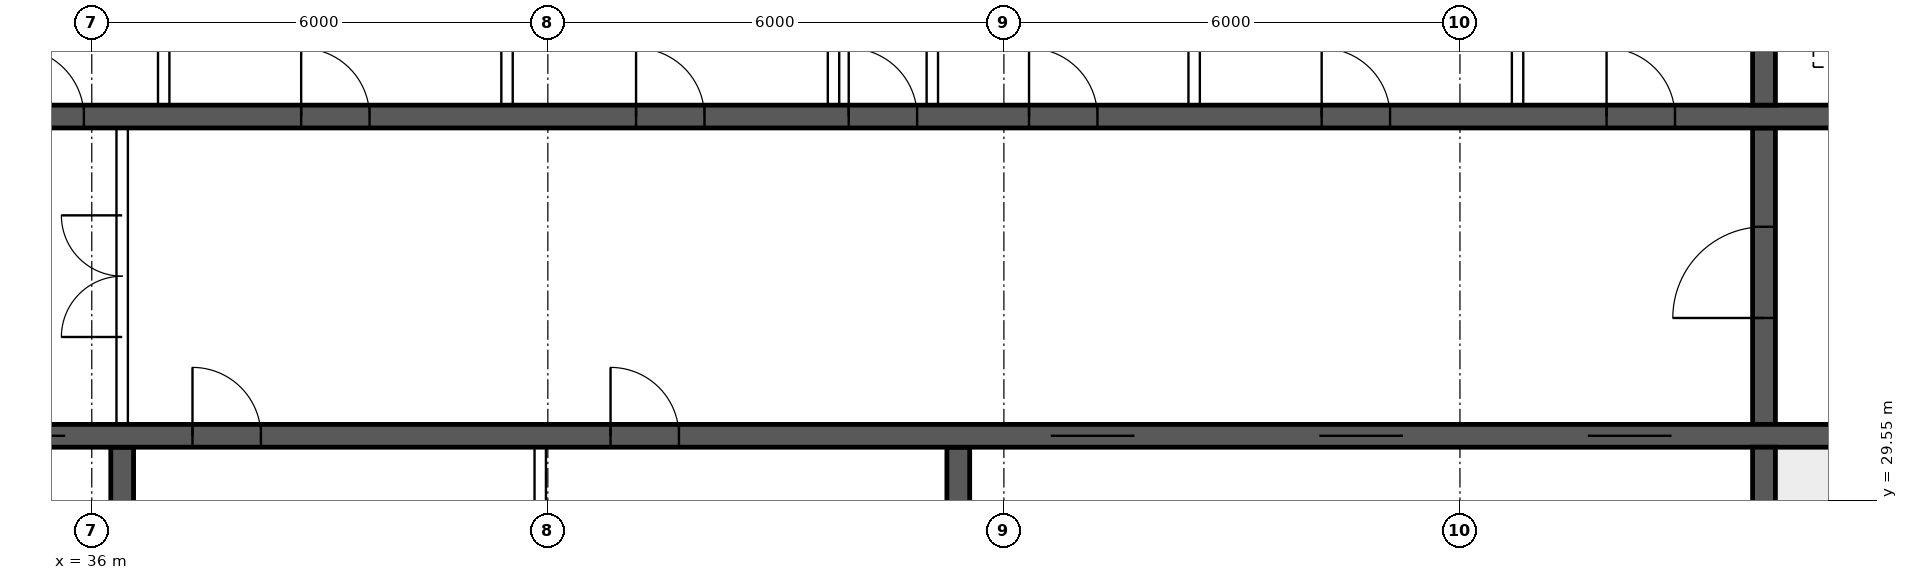
"""IFC4 building model, lengths in metres.
Left out: names, types, materials, properties, quantities, classifications, styles, units other than length and angle.
Written with IfcOpenShell. Run it as: python <this file> out.ifc"""

import sys

from ifc_helpers import new_model, si_unit, direction, frame, frame_2d, origin, place, context, subcontext, project, spatial, rectangle, extrude, element, fill, save


model = new_model("IFC4")
c1 = context("Model", 3, precision=1e-05, world=origin(), true_north=direction((0.0, 1.0)))
c2 = subcontext(c1, "Body", "Model", "MODEL_VIEW")
j1 = project(units=[si_unit("LENGTHUNIT", "METRE"), si_unit("PLANEANGLEUNIT", "RADIAN")], contexts=[c1])
p1 = place(None, origin())
s1 = spatial("IfcSite", under=j1, at=p1, CompositionType="ELEMENT")
p2 = place(p1, origin())
s2 = spatial("IfcBuilding", under=s1, at=p2, CompositionType="ELEMENT")
p3 = place(p2, frame((0.0, 0.0, 216.55)))
s3 = spatial("IfcBuildingStorey", under=s2, at=p3, CompositionType="ELEMENT", Elevation=216.55)
p4 = place(p3, frame((18.35, 30.4, 0.0), z_axis=(0.0, 0.0, 1.0), x_axis=(1.0, 0.0, 0.0)))
e1 = element("IfcWall", 1, at=p4, inside=s3, PredefinedType="SHEAR", context=c2, shape_type="SweptSolid", body=[
    extrude(rectangle(XDim=47.3, YDim=0.3, at=frame_2d((23.65, 0.0))), origin(), (0.0, 0.0, 1.0), 3.75),
])
p5 = place(p4, frame((0.4, 0.0, 0.0)))
e2 = element("IfcOpeningElement", 2, at=p5, cuts=e1, PredefinedType="OPENING", context=c2, shape_type="SweptSolid", body=[
    extrude(rectangle(XDim=1.0, YDim=2.1, at=frame_2d((0.5, 1.05))), frame((0.0, 0.16, 0.0), z_axis=(0.0, -1.0, 0.0), x_axis=(1.0, 0.0, 0.0)), (0.0, 0.0, 1.0), 0.32),
])
p6 = place(p4, frame((45.9, 0.0, 0.0)))
e3 = element("IfcOpeningElement", 3, at=p6, cuts=e1, PredefinedType="OPENING", context=c2, shape_type="SweptSolid", body=[
    extrude(rectangle(XDim=1.0, YDim=2.1, at=frame_2d((0.5, 1.05))), frame((0.0, 0.16, 0.0), z_axis=(0.0, -1.0, 0.0), x_axis=(1.0, 0.0, 0.0)), (0.0, 0.0, 1.0), 0.32),
])
p7 = place(p4, frame((8.4, 0.0, 0.0)))
e4 = element("IfcOpeningElement", 4, at=p7, cuts=e1, PredefinedType="OPENING", context=c2, shape_type="SweptSolid", body=[
    extrude(rectangle(XDim=1.1, YDim=2.1, at=frame_2d((0.55, 1.05))), frame((0.0, 0.16, 0.0), z_axis=(0.0, -1.0, 0.0), x_axis=(1.0, 0.0, 0.0)), (0.0, 0.0, 1.0), 0.32),
])
p8 = place(p4, frame((11.0, 0.0, 0.0)))
e5 = element("IfcOpeningElement", 5, at=p8, cuts=e1, PredefinedType="OPENING", context=c2, shape_type="SweptSolid", body=[
    extrude(rectangle(XDim=1.1, YDim=2.1, at=frame_2d((0.55, 1.05))), frame((0.0, 0.16, 0.0), z_axis=(0.0, -1.0, 0.0), x_axis=(1.0, 0.0, 0.0)), (0.0, 0.0, 1.0), 0.32),
])
p9 = place(p4, frame((13.6, 0.0, 0.0)))
e6 = element("IfcOpeningElement", 6, at=p9, cuts=e1, PredefinedType="OPENING", context=c2, shape_type="SweptSolid", body=[
    extrude(rectangle(XDim=1.1, YDim=2.1, at=frame_2d((0.55, 1.05))), frame((0.0, 0.16, 0.0), z_axis=(0.0, -1.0, 0.0), x_axis=(1.0, 0.0, 0.0)), (0.0, 0.0, 1.0), 0.32),
])
p10 = place(p4, frame((16.2, 0.0, 0.0)))
e7 = element("IfcOpeningElement", 7, at=p10, cuts=e1, PredefinedType="OPENING", context=c2, shape_type="SweptSolid", body=[
    extrude(rectangle(XDim=1.1, YDim=2.1, at=frame_2d((0.55, 1.05))), frame((0.0, 0.16, 0.0), z_axis=(0.0, -1.0, 0.0), x_axis=(1.0, 0.0, 0.0)), (0.0, 0.0, 1.0), 0.32),
])
p11 = place(p4, frame((18.975, 0.0, 0.0)))
e8 = element("IfcOpeningElement", 8, at=p11, cuts=e1, PredefinedType="OPENING", context=c2, shape_type="SweptSolid", body=[
    extrude(rectangle(XDim=0.9, YDim=2.1, at=frame_2d((0.45, 1.05))), frame((0.0, 0.16, 0.0), z_axis=(0.0, -1.0, 0.0), x_axis=(1.0, 0.0, 0.0)), (0.0, 0.0, 1.0), 0.32),
])
p12 = place(p4, frame((24.475, 0.0, 0.0)))
e9 = element("IfcOpeningElement", 9, at=p12, cuts=e1, PredefinedType="OPENING", context=c2, shape_type="SweptSolid", body=[
    extrude(rectangle(XDim=0.9, YDim=2.1, at=frame_2d((0.45, 1.05))), frame((0.0, 0.16, 0.0), z_axis=(0.0, -1.0, 0.0), x_axis=(1.0, 0.0, 0.0)), (0.0, 0.0, 1.0), 0.32),
])
p13 = place(p4, frame((30.267, 0.0, 0.0)))
e10 = element("IfcOpeningElement", 10, at=p13, cuts=e1, PredefinedType="OPENING", context=c2, shape_type="SweptSolid", body=[
    extrude(rectangle(XDim=1.1, YDim=2.1, at=frame_2d((0.55, 1.05))), frame((0.0, 0.16, 0.0), z_axis=(0.0, -1.0, 0.0), x_axis=(1.0, 0.0, 0.0)), (0.0, 0.0, 1.0), 0.32),
])
p14 = place(p4, frame((33.8, 0.0, 0.0)))
e11 = element("IfcOpeningElement", 11, at=p14, cuts=e1, PredefinedType="OPENING", context=c2, shape_type="SweptSolid", body=[
    extrude(rectangle(XDim=1.1, YDim=2.1, at=frame_2d((0.55, 1.05))), frame((0.0, 0.16, 0.0), z_axis=(0.0, -1.0, 0.0), x_axis=(1.0, 0.0, 0.0)), (0.0, 0.0, 1.0), 0.32),
])
p15 = place(p4, frame((37.333, 0.0, 0.0)))
e12 = element("IfcOpeningElement", 12, at=p15, cuts=e1, PredefinedType="OPENING", context=c2, shape_type="SweptSolid", body=[
    extrude(rectangle(XDim=1.1, YDim=2.1, at=frame_2d((0.55, 1.05))), frame((0.0, 0.16, 0.0), z_axis=(0.0, -1.0, 0.0), x_axis=(1.0, 0.0, 0.0)), (0.0, 0.0, 1.0), 0.32),
])
p16 = place(p3, frame((18.35, 34.6, 0.0), z_axis=(0.0, 0.0, 1.0), x_axis=(1.0, 0.0, 0.0)))
e13 = element("IfcWall", 13, at=p16, inside=s3, PredefinedType="SHEAR", context=c2, shape_type="SweptSolid", body=[
    extrude(rectangle(XDim=47.3, YDim=0.3, at=frame_2d((23.65, 0.0))), origin(), (0.0, 0.0, 1.0), 3.75),
])
p17 = place(p16, frame((0.9, 0.0, 0.0)))
e14 = element("IfcOpeningElement", 14, at=p17, cuts=e13, PredefinedType="OPENING", context=c2, shape_type="SweptSolid", body=[
    extrude(rectangle(XDim=1.1, YDim=2.1, at=frame_2d((0.55, 1.05))), frame((0.0, 0.16, 0.0), z_axis=(0.0, -1.0, 0.0), x_axis=(1.0, 0.0, 0.0)), (0.0, 0.0, 1.0), 0.32),
])
p18 = place(p16, frame((45.3, 0.0, 0.0)))
e15 = element("IfcOpeningElement", 15, at=p18, cuts=e13, PredefinedType="OPENING", context=c2, shape_type="SweptSolid", body=[
    extrude(rectangle(XDim=1.1, YDim=2.1, at=frame_2d((0.55, 1.05))), frame((0.0, 0.16, 0.0), z_axis=(0.0, -1.0, 0.0), x_axis=(1.0, 0.0, 0.0)), (0.0, 0.0, 1.0), 0.32),
])
p19 = place(p16, frame((4.25, 0.0, 0.0)))
e16 = element("IfcOpeningElement", 16, at=p19, cuts=e13, PredefinedType="OPENING", context=c2, shape_type="SweptSolid", body=[
    extrude(rectangle(XDim=0.9, YDim=2.1, at=frame_2d((0.45, 1.05))), frame((0.0, 0.16, 0.0), z_axis=(0.0, -1.0, 0.0), x_axis=(1.0, 0.0, 0.0)), (0.0, 0.0, 1.0), 0.32),
])
p20 = place(p16, frame((42.15, 0.0, 0.0)))
e17 = element("IfcOpeningElement", 17, at=p20, cuts=e13, PredefinedType="OPENING", context=c2, shape_type="SweptSolid", body=[
    extrude(rectangle(XDim=0.9, YDim=2.1, at=frame_2d((0.45, 1.05))), frame((0.0, 0.16, 0.0), z_axis=(0.0, -1.0, 0.0), x_axis=(1.0, 0.0, 0.0)), (0.0, 0.0, 1.0), 0.32),
])
p21 = place(p16, frame((9.025, 0.0, 0.0)))
e18 = element("IfcOpeningElement", 18, at=p21, cuts=e13, PredefinedType="OPENING", context=c2, shape_type="SweptSolid", body=[
    extrude(rectangle(XDim=0.9, YDim=2.1, at=frame_2d((0.45, 1.05))), frame((0.0, 0.16, 0.0), z_axis=(0.0, -1.0, 0.0), x_axis=(1.0, 0.0, 0.0)), (0.0, 0.0, 1.0), 0.32),
])
p22 = place(p16, frame((12.999, 0.0, 0.0)))
e19 = element("IfcOpeningElement", 19, at=p22, cuts=e13, PredefinedType="OPENING", context=c2, shape_type="SweptSolid", body=[
    extrude(rectangle(XDim=0.9, YDim=2.1, at=frame_2d((0.45, 1.05))), frame((0.0, 0.16, 0.0), z_axis=(0.0, -1.0, 0.0), x_axis=(1.0, 0.0, 0.0)), (0.0, 0.0, 1.0), 0.32),
])
p23 = place(p16, frame((16.646, 0.0, 0.0)))
e20 = element("IfcOpeningElement", 20, at=p23, cuts=e13, PredefinedType="OPENING", context=c2, shape_type="SweptSolid", body=[
    extrude(rectangle(XDim=0.9, YDim=2.1, at=frame_2d((0.45, 1.05))), frame((0.0, 0.16, 0.0), z_axis=(0.0, -1.0, 0.0), x_axis=(1.0, 0.0, 0.0)), (0.0, 0.0, 1.0), 0.32),
])
p24 = place(p16, frame((20.405, 0.0, 0.0)))
e21 = element("IfcOpeningElement", 21, at=p24, cuts=e13, PredefinedType="OPENING", context=c2, shape_type="SweptSolid", body=[
    extrude(rectangle(XDim=0.9, YDim=2.1, at=frame_2d((0.45, 1.05))), frame((0.0, 0.16, 0.0), z_axis=(0.0, -1.0, 0.0), x_axis=(1.0, 0.0, 0.0)), (0.0, 0.0, 1.0), 0.32),
])
p25 = place(p16, frame((24.811, 0.0, 0.0)))
e22 = element("IfcOpeningElement", 22, at=p25, cuts=e13, PredefinedType="OPENING", context=c2, shape_type="SweptSolid", body=[
    extrude(rectangle(XDim=0.9, YDim=2.1, at=frame_2d((0.45, 1.05))), frame((0.0, 0.16, 0.0), z_axis=(0.0, -1.0, 0.0), x_axis=(1.0, 0.0, 0.0)), (0.0, 0.0, 1.0), 0.32),
])
p26 = place(p16, frame((27.608, 0.0, 0.0)))
e23 = element("IfcOpeningElement", 23, at=p26, cuts=e13, PredefinedType="OPENING", context=c2, shape_type="SweptSolid", body=[
    extrude(rectangle(XDim=0.9, YDim=2.1, at=frame_2d((0.45, 1.05))), frame((0.0, 0.16, 0.0), z_axis=(0.0, -1.0, 0.0), x_axis=(1.0, 0.0, 0.0)), (0.0, 0.0, 1.0), 0.32),
])
p27 = place(p16, frame((29.981, 0.0, 0.0)))
e24 = element("IfcOpeningElement", 24, at=p27, cuts=e13, PredefinedType="OPENING", context=c2, shape_type="SweptSolid", body=[
    extrude(rectangle(XDim=0.9, YDim=2.1, at=frame_2d((0.45, 1.05))), frame((0.0, 0.16, 0.0), z_axis=(0.0, -1.0, 0.0), x_axis=(1.0, 0.0, 0.0)), (0.0, 0.0, 1.0), 0.32),
])
p28 = place(p16, frame((33.831, 0.0, 0.0)))
e25 = element("IfcOpeningElement", 25, at=p28, cuts=e13, PredefinedType="OPENING", context=c2, shape_type="SweptSolid", body=[
    extrude(rectangle(XDim=0.9, YDim=2.1, at=frame_2d((0.45, 1.05))), frame((0.0, 0.16, 0.0), z_axis=(0.0, -1.0, 0.0), x_axis=(1.0, 0.0, 0.0)), (0.0, 0.0, 1.0), 0.32),
])
p29 = place(p16, frame((37.579, 0.0, 0.0)))
e26 = element("IfcOpeningElement", 26, at=p29, cuts=e13, PredefinedType="OPENING", context=c2, shape_type="SweptSolid", body=[
    extrude(rectangle(XDim=0.9, YDim=2.1, at=frame_2d((0.45, 1.05))), frame((0.0, 0.16, 0.0), z_axis=(0.0, -1.0, 0.0), x_axis=(1.0, 0.0, 0.0)), (0.0, 0.0, 1.0), 0.32),
])
p30 = place(p3, frame((58.0, 26.15, 0.0), z_axis=(0.0, 0.0, 1.0), x_axis=(0.0, 1.0, 0.0)))
e27 = element("IfcWall", 27, at=p30, inside=s3, PredefinedType="SHEAR", context=c2, shape_type="SweptSolid", body=[
    extrude(rectangle(XDim=4.1, YDim=0.3, at=frame_2d((2.05, 0.0))), origin(), (0.0, 0.0, 1.0), 3.75),
])
p31 = place(p3, frame((58.0, 30.55, 0.0), z_axis=(0.0, 0.0, 1.0), x_axis=(0.0, 1.0, 0.0)))
e28 = element("IfcWall", 28, at=p31, inside=s3, PredefinedType="SHEAR", context=c2, shape_type="SweptSolid", body=[
    extrude(rectangle(XDim=3.9, YDim=0.3, at=frame_2d((1.95, 0.0))), origin(), (0.0, 0.0, 1.0), 3.75),
])
p32 = place(p31, frame((1.4, 0.0, 0.0)))
e29 = element("IfcOpeningElement", 29, at=p32, cuts=e28, PredefinedType="OPENING", context=c2, shape_type="SweptSolid", body=[
    extrude(rectangle(XDim=1.2, YDim=2.1, at=frame_2d((0.6, 1.05))), frame((0.0, 0.16, 0.0), z_axis=(0.0, -1.0, 0.0), x_axis=(1.0, 0.0, 0.0)), (0.0, 0.0, 1.0), 0.32),
])
p33 = place(p3, frame((58.0, 34.75, 0.0), z_axis=(0.0, 0.0, 1.0), x_axis=(0.0, 1.0, 0.0)))
e30 = element("IfcWall", 30, at=p33, inside=s3, PredefinedType="SHEAR", context=c2, shape_type="SweptSolid", body=[
    extrude(rectangle(XDim=3.1, YDim=0.3, at=frame_2d((1.55, 0.0))), origin(), (0.0, 0.0, 1.0), 3.75),
])
for number, where, z_axis, x_axis in (
    (31, (36.4, 26.15, 0.0), (0.0, 0.0, 1.0), (0.0, 1.0, 0.0)),
    (32, (47.4, 26.15, 0.0), (0.0, 0.0, 1.0), (0.0, 1.0, 0.0)),
):
    element("IfcWall", number, at=place(p3, frame(where, z_axis=z_axis, x_axis=x_axis)), inside=s3, PredefinedType="SHEAR", context=c2, shape_type="SweptSolid", body=[
        extrude(rectangle(XDim=4.1, YDim=0.3, at=frame_2d((2.05, 0.0))), origin(), (0.0, 0.0, 1.0), 3.75),
    ])
p34 = place(p3, frame((36.4, 30.55, 0.0), z_axis=(0.0, 0.0, 1.0), x_axis=(0.0, 1.0, 0.0)))
e33 = element("IfcWall", 33, at=p34, inside=s3, PredefinedType="SOLIDWALL", context=c2, shape_type="SweptSolid", body=[
    extrude(rectangle(XDim=3.9, YDim=0.15, at=frame_2d((1.95, 0.0))), origin(), (0.0, 0.0, 1.0), 3.5),
])
p35 = place(p34, frame((1.15, 0.0, 0.0)))
e34 = element("IfcOpeningElement", 34, at=p35, cuts=e33, PredefinedType="OPENING", context=c2, shape_type="SweptSolid", body=[
    extrude(rectangle(XDim=1.6, YDim=2.1, at=frame_2d((0.8, 1.05))), frame((0.0, 0.085, 0.0), z_axis=(0.0, -1.0, 0.0), x_axis=(1.0, 0.0, 0.0)), (0.0, 0.0, 1.0), 0.17),
])
for number, where, z_axis, x_axis in (
    (35, (36.946, 34.75, 0.0), (0.0, 0.0, 1.0), (0.0, 1.0, 0.0)),
    (36, (41.463, 34.75, 0.0), (0.0, 0.0, 1.0), (0.0, 1.0, 0.0)),
    (37, (45.758, 34.75, 0.0), (0.0, 0.0, 1.0), (0.0, 1.0, 0.0)),
    (38, (47.058, 34.75, 0.0), (0.0, 0.0, 1.0), (0.0, 1.0, 0.0)),
    (39, (50.503, 34.75, 0.0), (0.0, 0.0, 1.0), (0.0, 1.0, 0.0)),
    (40, (54.758, 34.75, 0.0), (0.0, 0.0, 1.0), (0.0, 1.0, 0.0)),
):
    element("IfcWall", number, at=place(p3, frame(where, z_axis=z_axis, x_axis=x_axis)), inside=s3, PredefinedType="SOLIDWALL", context=c2, shape_type="SweptSolid", body=[
        extrude(rectangle(XDim=3.1, YDim=0.15, at=frame_2d((1.55, 0.0))), origin(), (0.0, 0.0, 1.0), 3.5),
    ])
p36 = place(p3, frame((41.9, 26.15, 0.0), z_axis=(0.0, 0.0, 1.0), x_axis=(0.0, 1.0, 0.0)))
e41 = element("IfcWall", 41, at=p36, inside=s3, PredefinedType="SOLIDWALL", context=c2, shape_type="SweptSolid", body=[
    extrude(rectangle(XDim=4.1, YDim=0.15, at=frame_2d((2.05, 0.0))), origin(), (0.0, 0.0, 1.0), 3.5),
])
p37 = place(p35, origin())
e42 = element("IfcDoor", 42, at=p37, inside=s3, OperationType="DOUBLE_DOOR_SINGLE_SWING", PredefinedType="DOOR", context=c2, shape_type="SweptSolid", body=[
    extrude(rectangle(XDim=1.6, YDim=2.1, at=frame_2d((0.8, 1.05))), frame((0.0, 0.025, 0.0), z_axis=(0.0, -1.0, 0.0), x_axis=(1.0, 0.0, 0.0)), (0.0, 0.0, 1.0), 0.05),
])
fill(e34, e42)
p38 = place(p32, origin())
e43 = element("IfcDoor", 43, at=p38, inside=s3, OperationType="SINGLE_SWING_LEFT", PredefinedType="DOOR", context=c2, shape_type="SweptSolid", body=[
    extrude(rectangle(XDim=1.2, YDim=2.1, at=frame_2d((0.6, 1.05))), frame((0.0, 0.025, 0.0), z_axis=(0.0, -1.0, 0.0), x_axis=(1.0, 0.0, 0.0)), (0.0, 0.0, 1.0), 0.05),
])
fill(e29, e43)
p39 = place(p23, origin())
e44 = element("IfcDoor", 44, at=p39, inside=s3, OperationType="SINGLE_SWING_LEFT", PredefinedType="DOOR", context=c2, shape_type="SweptSolid", body=[
    extrude(rectangle(XDim=0.9, YDim=2.1, at=frame_2d((0.45, 1.05))), frame((0.0, 0.025, 0.0), z_axis=(0.0, -1.0, 0.0), x_axis=(1.0, 0.0, 0.0)), (0.0, 0.0, 1.0), 0.05),
])
fill(e20, e44)
p40 = place(p24, origin())
e45 = element("IfcDoor", 45, at=p40, inside=s3, OperationType="SINGLE_SWING_LEFT", PredefinedType="DOOR", context=c2, shape_type="SweptSolid", body=[
    extrude(rectangle(XDim=0.9, YDim=2.1, at=frame_2d((0.45, 1.05))), frame((0.0, 0.025, 0.0), z_axis=(0.0, -1.0, 0.0), x_axis=(1.0, 0.0, 0.0)), (0.0, 0.0, 1.0), 0.05),
])
fill(e21, e45)
p41 = place(p25, origin())
e46 = element("IfcDoor", 46, at=p41, inside=s3, OperationType="SINGLE_SWING_LEFT", PredefinedType="DOOR", context=c2, shape_type="SweptSolid", body=[
    extrude(rectangle(XDim=0.9, YDim=2.1, at=frame_2d((0.45, 1.05))), frame((0.0, 0.025, 0.0), z_axis=(0.0, -1.0, 0.0), x_axis=(1.0, 0.0, 0.0)), (0.0, 0.0, 1.0), 0.05),
])
fill(e22, e46)
p42 = place(p26, origin())
e47 = element("IfcDoor", 47, at=p42, inside=s3, OperationType="SINGLE_SWING_LEFT", PredefinedType="DOOR", context=c2, shape_type="SweptSolid", body=[
    extrude(rectangle(XDim=0.9, YDim=2.1, at=frame_2d((0.45, 1.05))), frame((0.0, 0.025, 0.0), z_axis=(0.0, -1.0, 0.0), x_axis=(1.0, 0.0, 0.0)), (0.0, 0.0, 1.0), 0.05),
])
fill(e23, e47)
p43 = place(p27, origin())
e48 = element("IfcDoor", 48, at=p43, inside=s3, OperationType="SINGLE_SWING_LEFT", PredefinedType="DOOR", context=c2, shape_type="SweptSolid", body=[
    extrude(rectangle(XDim=0.9, YDim=2.1, at=frame_2d((0.45, 1.05))), frame((0.0, 0.025, 0.0), z_axis=(0.0, -1.0, 0.0), x_axis=(1.0, 0.0, 0.0)), (0.0, 0.0, 1.0), 0.05),
])
fill(e24, e48)
p44 = place(p28, origin())
e49 = element("IfcDoor", 49, at=p44, inside=s3, OperationType="SINGLE_SWING_LEFT", PredefinedType="DOOR", context=c2, shape_type="SweptSolid", body=[
    extrude(rectangle(XDim=0.9, YDim=2.1, at=frame_2d((0.45, 1.05))), frame((0.0, 0.025, 0.0), z_axis=(0.0, -1.0, 0.0), x_axis=(1.0, 0.0, 0.0)), (0.0, 0.0, 1.0), 0.05),
])
fill(e25, e49)
p45 = place(p29, origin())
e50 = element("IfcDoor", 50, at=p45, inside=s3, OperationType="SINGLE_SWING_LEFT", PredefinedType="DOOR", context=c2, shape_type="SweptSolid", body=[
    extrude(rectangle(XDim=0.9, YDim=2.1, at=frame_2d((0.45, 1.05))), frame((0.0, 0.025, 0.0), z_axis=(0.0, -1.0, 0.0), x_axis=(1.0, 0.0, 0.0)), (0.0, 0.0, 1.0), 0.05),
])
fill(e26, e50)
p46 = place(p10, origin())
e51 = element("IfcDoor", 51, at=p46, inside=s3, OperationType="DOUBLE_DOOR_SLIDING", PredefinedType="DOOR", context=c2, shape_type="SweptSolid", body=[
    extrude(rectangle(XDim=1.1, YDim=2.1, at=frame_2d((0.55, 1.05))), frame((0.0, 0.025, 0.0), z_axis=(0.0, -1.0, 0.0), x_axis=(1.0, 0.0, 0.0)), (0.0, 0.0, 1.0), 0.05),
])
fill(e7, e51)
p47 = place(p11, origin())
e52 = element("IfcDoor", 52, at=p47, inside=s3, OperationType="SINGLE_SWING_LEFT", PredefinedType="DOOR", context=c2, shape_type="SweptSolid", body=[
    extrude(rectangle(XDim=0.9, YDim=2.1, at=frame_2d((0.45, 1.05))), frame((0.0, 0.025, 0.0), z_axis=(0.0, -1.0, 0.0), x_axis=(1.0, 0.0, 0.0)), (0.0, 0.0, 1.0), 0.05),
])
fill(e8, e52)
p48 = place(p12, origin())
e53 = element("IfcDoor", 53, at=p48, inside=s3, OperationType="SINGLE_SWING_LEFT", PredefinedType="DOOR", context=c2, shape_type="SweptSolid", body=[
    extrude(rectangle(XDim=0.9, YDim=2.1, at=frame_2d((0.45, 1.05))), frame((0.0, 0.025, 0.0), z_axis=(0.0, -1.0, 0.0), x_axis=(1.0, 0.0, 0.0)), (0.0, 0.0, 1.0), 0.05),
])
fill(e9, e53)
p49 = place(p13, origin())
e54 = element("IfcDoor", 54, at=p49, inside=s3, OperationType="DOUBLE_DOOR_SLIDING", PredefinedType="DOOR", context=c2, shape_type="SweptSolid", body=[
    extrude(rectangle(XDim=1.1, YDim=2.1, at=frame_2d((0.55, 1.05))), frame((0.0, 0.025, 0.0), z_axis=(0.0, -1.0, 0.0), x_axis=(1.0, 0.0, 0.0)), (0.0, 0.0, 1.0), 0.05),
])
fill(e10, e54)
p50 = place(p14, origin())
e55 = element("IfcDoor", 55, at=p50, inside=s3, OperationType="DOUBLE_DOOR_SLIDING", PredefinedType="DOOR", context=c2, shape_type="SweptSolid", body=[
    extrude(rectangle(XDim=1.1, YDim=2.1, at=frame_2d((0.55, 1.05))), frame((0.0, 0.025, 0.0), z_axis=(0.0, -1.0, 0.0), x_axis=(1.0, 0.0, 0.0)), (0.0, 0.0, 1.0), 0.05),
])
fill(e11, e55)
p51 = place(p15, origin())
e56 = element("IfcDoor", 56, at=p51, inside=s3, OperationType="DOUBLE_DOOR_SLIDING", PredefinedType="DOOR", context=c2, shape_type="SweptSolid", body=[
    extrude(rectangle(XDim=1.1, YDim=2.1, at=frame_2d((0.55, 1.05))), frame((0.0, 0.025, 0.0), z_axis=(0.0, -1.0, 0.0), x_axis=(1.0, 0.0, 0.0)), (0.0, 0.0, 1.0), 0.05),
])
fill(e12, e56)
save(model, sys.argv[1])
